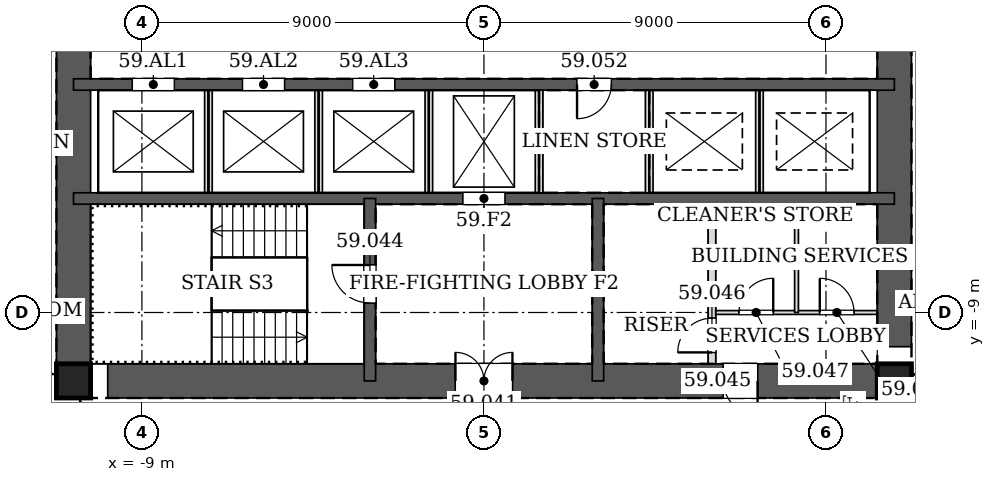
"""IFC4 building model, lengths in metres.
Left out: names, types, materials, properties, quantities, classifications, styles, units other than length and angle.
Written with IfcOpenShell. Run it as: python <this file> out.ifc"""

import sys

from ifc_helpers import new_model, si_unit, direction, frame, frame_2d, origin, origin_2d, place, context, subcontext, project, spatial, rectangle, hollow_rectangle, extrude, element, fill, save


model = new_model("IFC4")
c1 = context("Model", 3, precision=1e-05, world=origin(), true_north=direction((0.0, 1.0)))
c2 = subcontext(c1, "Body", "Model", "MODEL_VIEW")
j1 = project(units=[si_unit("LENGTHUNIT", "METRE"), si_unit("PLANEANGLEUNIT", "RADIAN")], contexts=[c1])
p1 = place(None, origin())
s1 = spatial("IfcSite", under=j1, at=p1, CompositionType="ELEMENT")
p2 = place(p1, origin())
s2 = spatial("IfcBuilding", under=s1, at=p2, CompositionType="ELEMENT")
p3 = place(p2, frame((0.0, 0.0, 248.2)))
s3 = spatial("IfcBuildingStorey", under=s2, at=p3, CompositionType="ELEMENT", Elevation=248.2)
for number, where, z_axis, x_axis in (
    (1, (-10.8, -10.8, 0.0), (0.0, 0.0, 1.0), (1.0, 0.0, 0.0)),
    (2, (10.8, -10.8, 0.0), (0.0, 0.0, 1.0), (1.0, 0.0, 0.0)),
):
    element("IfcColumn", number, at=place(p3, frame(where, z_axis=z_axis, x_axis=x_axis)), inside=s3, PredefinedType="COLUMN", context=c2, shape_type="SweptSolid", body=[
        extrude(hollow_rectangle(XDim=0.9, YDim=0.9, WallThickness=0.04, at=origin_2d()), origin(), (0.0, 0.0, 1.0), 3.4),
    ])
p4 = place(p3, frame((-10.8, -10.8, 0.0), z_axis=(0.0, 0.0, 1.0), x_axis=(1.0, 0.0, 0.0)))
e3 = element("IfcWall", 3, at=p4, inside=s3, PredefinedType="SOLIDWALL", context=c2, shape_type="SweptSolid", body=[
    extrude(rectangle(XDim=21.6, YDim=0.9, at=frame_2d((10.8, 0.0))), origin(), (0.0, 0.0, 1.0), 3.4),
])
p5 = place(p4, frame((10.05, 0.0, 0.0)))
e4 = element("IfcOpeningElement", 4, at=p5, cuts=e3, PredefinedType="OPENING", context=c2, shape_type="SweptSolid", body=[
    extrude(rectangle(XDim=1.5, YDim=2.1, at=frame_2d((0.75, 1.05))), frame((0.0, 0.46, 0.0), z_axis=(0.0, -1.0, 0.0), x_axis=(1.0, 0.0, 0.0)), (0.0, 0.0, 1.0), 0.92),
])
p6 = place(p4, frame((17.1, 0.0, 0.0)))
e5 = element("IfcOpeningElement", 5, at=p6, cuts=e3, PredefinedType="OPENING", context=c2, shape_type="SweptSolid", body=[
    extrude(rectangle(XDim=0.9, YDim=2.1, at=frame_2d((0.45, 1.05))), frame((0.0, 0.46, 0.0), z_axis=(0.0, -1.0, 0.0), x_axis=(1.0, 0.0, 0.0)), (0.0, 0.0, 1.0), 0.92),
])
p7 = place(p3, frame((10.8, -10.8, 0.0), z_axis=(0.0, 0.0, 1.0), x_axis=(0.0, 1.0, 0.0)))
e6 = element("IfcWall", 6, at=p7, inside=s3, PredefinedType="SOLIDWALL", context=c2, shape_type="SweptSolid", body=[
    extrude(rectangle(XDim=21.6, YDim=0.9, at=frame_2d((10.8, 0.0))), origin(), (0.0, 0.0, 1.0), 3.4),
])
p8 = place(p7, frame((11.7, 0.0, 0.0)))
e7 = element("IfcOpeningElement", 7, at=p8, cuts=e6, PredefinedType="OPENING", context=c2, shape_type="SweptSolid", body=[
    extrude(rectangle(XDim=1.2, YDim=2.1, at=frame_2d((0.6, 1.05))), frame((0.0, 0.46, 0.0), z_axis=(0.0, -1.0, 0.0), x_axis=(1.0, 0.0, 0.0)), (0.0, 0.0, 1.0), 0.92),
])
p9 = place(p7, frame((8.7, 0.0, 0.0)))
e8 = element("IfcOpeningElement", 8, at=p9, cuts=e6, PredefinedType="OPENING", context=c2, shape_type="SweptSolid", body=[
    extrude(rectangle(XDim=1.2, YDim=2.1, at=frame_2d((0.6, 1.05))), frame((0.0, 0.46, 0.0), z_axis=(0.0, -1.0, 0.0), x_axis=(1.0, 0.0, 0.0)), (0.0, 0.0, 1.0), 0.92),
])
p10 = place(p3, frame((-10.8, 10.8, 0.0), z_axis=(0.0, 0.0, 1.0), x_axis=(0.0, -1.0, 0.0)))
e9 = element("IfcWall", 9, at=p10, inside=s3, PredefinedType="SOLIDWALL", context=c2, shape_type="SweptSolid", body=[
    extrude(rectangle(XDim=21.6, YDim=0.9, at=frame_2d((10.8, 0.0))), origin(), (0.0, 0.0, 1.0), 3.4),
])
p11 = place(p10, frame((8.7, 0.0, 0.0)))
e10 = element("IfcOpeningElement", 10, at=p11, cuts=e9, PredefinedType="OPENING", context=c2, shape_type="SweptSolid", body=[
    extrude(rectangle(XDim=1.2, YDim=2.1, at=frame_2d((0.6, 1.05))), frame((0.0, 0.46, 0.0), z_axis=(0.0, -1.0, 0.0), x_axis=(1.0, 0.0, 0.0)), (0.0, 0.0, 1.0), 0.92),
])
p12 = place(p10, frame((11.7, 0.0, 0.0)))
e11 = element("IfcOpeningElement", 11, at=p12, cuts=e9, PredefinedType="OPENING", context=c2, shape_type="SweptSolid", body=[
    extrude(rectangle(XDim=1.2, YDim=2.1, at=frame_2d((0.6, 1.05))), frame((0.0, 0.46, 0.0), z_axis=(0.0, -1.0, 0.0), x_axis=(1.0, 0.0, 0.0)), (0.0, 0.0, 1.0), 0.92),
])
p13 = place(p3, frame((-10.8, -3.0, 0.0), z_axis=(0.0, 0.0, 1.0), x_axis=(1.0, 0.0, 0.0)))
e12 = element("IfcWall", 12, at=p13, inside=s3, PredefinedType="SOLIDWALL", context=c2, shape_type="SweptSolid", body=[
    extrude(rectangle(XDim=21.6, YDim=0.3, at=frame_2d((10.8, 0.0))), origin(), (0.0, 0.0, 1.0), 3.4),
])
p14 = place(p13, frame((13.25, 0.0, 0.0)))
e13 = element("IfcOpeningElement", 13, at=p14, cuts=e12, PredefinedType="OPENING", context=c2, shape_type="SweptSolid", body=[
    extrude(rectangle(XDim=0.9, YDim=2.1, at=frame_2d((0.45, 1.05))), frame((0.0, 0.16, 0.0), z_axis=(0.0, -1.0, 0.0), x_axis=(1.0, 0.0, 0.0)), (0.0, 0.0, 1.0), 0.32),
])
p15 = place(p13, frame((1.55, 0.0, 0.0)))
e14 = element("IfcOpeningElement", 14, at=p15, cuts=e12, PredefinedType="OPENING", context=c2, shape_type="SweptSolid", body=[
    extrude(rectangle(XDim=1.1, YDim=2.1, at=frame_2d((0.55, 1.05))), frame((0.0, 0.16, 0.0), z_axis=(0.0, -1.0, 0.0), x_axis=(1.0, 0.0, 0.0)), (0.0, 0.0, 1.0), 0.32),
])
p16 = place(p13, frame((4.45, 0.0, 0.0)))
e15 = element("IfcOpeningElement", 15, at=p16, cuts=e12, PredefinedType="OPENING", context=c2, shape_type="SweptSolid", body=[
    extrude(rectangle(XDim=1.1, YDim=2.1, at=frame_2d((0.55, 1.05))), frame((0.0, 0.16, 0.0), z_axis=(0.0, -1.0, 0.0), x_axis=(1.0, 0.0, 0.0)), (0.0, 0.0, 1.0), 0.32),
])
p17 = place(p13, frame((7.35, 0.0, 0.0)))
e16 = element("IfcOpeningElement", 16, at=p17, cuts=e12, PredefinedType="OPENING", context=c2, shape_type="SweptSolid", body=[
    extrude(rectangle(XDim=1.1, YDim=2.1, at=frame_2d((0.55, 1.05))), frame((0.0, 0.16, 0.0), z_axis=(0.0, -1.0, 0.0), x_axis=(1.0, 0.0, 0.0)), (0.0, 0.0, 1.0), 0.32),
])
p18 = place(p3, frame((-10.8, -6.0, 0.0), z_axis=(0.0, 0.0, 1.0), x_axis=(1.0, 0.0, 0.0)))
e17 = element("IfcWall", 17, at=p18, inside=s3, PredefinedType="SOLIDWALL", context=c2, shape_type="SweptSolid", body=[
    extrude(rectangle(XDim=21.6, YDim=0.3, at=frame_2d((10.8, 0.0))), origin(), (0.0, 0.0, 1.0), 3.4),
])
p19 = place(p18, frame((10.25, 0.0, 0.0)))
e18 = element("IfcOpeningElement", 18, at=p19, cuts=e17, PredefinedType="OPENING", context=c2, shape_type="SweptSolid", body=[
    extrude(rectangle(XDim=1.1, YDim=2.1, at=frame_2d((0.55, 1.05))), frame((0.0, 0.16, 0.0), z_axis=(0.0, -1.0, 0.0), x_axis=(1.0, 0.0, 0.0)), (0.0, 0.0, 1.0), 0.32),
])
p20 = place(p3, frame((-3.0, -6.0, 0.0), z_axis=(0.0, 0.0, 1.0), x_axis=(0.0, -1.0, 0.0)))
e19 = element("IfcWall", 19, at=p20, inside=s3, PredefinedType="SOLIDWALL", context=c2, shape_type="SweptSolid", body=[
    extrude(rectangle(XDim=4.8, YDim=0.3, at=frame_2d((2.4, 0.0))), origin(), (0.0, 0.0, 1.0), 3.4),
])
p21 = place(p20, frame((1.75, 0.0, 0.0)))
e20 = element("IfcOpeningElement", 20, at=p21, cuts=e19, PredefinedType="OPENING", context=c2, shape_type="SweptSolid", body=[
    extrude(rectangle(XDim=1.0, YDim=2.1, at=frame_2d((0.5, 1.05))), frame((0.0, 0.16, 0.0), z_axis=(0.0, -1.0, 0.0), x_axis=(1.0, 0.0, 0.0)), (0.0, 0.0, 1.0), 0.32),
])
p22 = place(p3, frame((3.0, -6.0, 0.0), z_axis=(0.0, 0.0, 1.0), x_axis=(0.0, -1.0, 0.0)))
e21 = element("IfcWall", 21, at=p22, inside=s3, PredefinedType="SOLIDWALL", context=c2, shape_type="SweptSolid", body=[
    extrude(rectangle(XDim=4.8, YDim=0.3, at=frame_2d((2.4, 0.0))), origin(), (0.0, 0.0, 1.0), 3.4),
])
for number, where, z_axis, x_axis in (
    (22, (-7.25, -5.85, 0.0), (0.0, 0.0, 1.0), (0.0, 1.0, 0.0)),
    (23, (-4.35, -5.85, 0.0), (0.0, 0.0, 1.0), (0.0, 1.0, 0.0)),
    (24, (-1.45, -5.85, 0.0), (0.0, 0.0, 1.0), (0.0, 1.0, 0.0)),
):
    element("IfcWall", number, at=place(p3, frame(where, z_axis=z_axis, x_axis=x_axis)), inside=s3, PredefinedType="PARTITIONING", context=c2, shape_type="SweptSolid", body=[
        extrude(rectangle(XDim=2.7, YDim=0.2, at=frame_2d((1.35, 0.0))), origin(), (0.0, 0.0, 1.0), 3.4),
    ])
for number, where, z_axis, x_axis in (
    (25, (1.45, -5.85, 0.0), (0.0, 0.0, 1.0), (0.0, 1.0, 0.0)),
    (26, (4.35, -5.85, 0.0), (0.0, 0.0, 1.0), (0.0, 1.0, 0.0)),
):
    element("IfcWall", number, at=place(p3, frame(where, z_axis=z_axis, x_axis=x_axis)), inside=s3, PredefinedType="PARTITIONING", context=c2, shape_type="SweptSolid", body=[
        extrude(rectangle(XDim=2.7, YDim=0.2, at=frame_2d((1.35, 0.0))), origin(), (0.0, 0.0, 1.0), 3.2),
    ])
p23 = place(p3, frame((7.25, -5.85, 0.0), z_axis=(0.0, 0.0, 1.0), x_axis=(0.0, 1.0, 0.0)))
e27 = element("IfcWall", 27, at=p23, inside=s3, PredefinedType="PARTITIONING", context=c2, shape_type="SweptSolid", body=[
    extrude(rectangle(XDim=2.7, YDim=0.2, at=frame_2d((1.35, 0.0))), origin(), (0.0, 0.0, 1.0), 3.4),
])
p24 = place(p3, frame((6.0, -10.35, 0.0), z_axis=(0.0, 0.0, 1.0), x_axis=(0.0, 1.0, 0.0)))
e28 = element("IfcWall", 28, at=p24, inside=s3, PredefinedType="PARTITIONING", context=c2, shape_type="SweptSolid", body=[
    extrude(rectangle(XDim=4.2, YDim=0.2, at=frame_2d((2.1, 0.0))), origin(), (0.0, 0.0, 1.0), 3.2),
])
p25 = place(p24, frame((0.3, 0.0, 0.0)))
e29 = element("IfcOpeningElement", 29, at=p25, cuts=e28, PredefinedType="OPENING", context=c2, shape_type="SweptSolid", body=[
    extrude(rectangle(XDim=0.9, YDim=2.1, at=frame_2d((0.45, 1.05))), frame((0.0, 0.11, 0.0), z_axis=(0.0, -1.0, 0.0), x_axis=(1.0, 0.0, 0.0)), (0.0, 0.0, 1.0), 0.22),
])
p26 = place(p3, frame((6.1, -9.0, 0.0), z_axis=(0.0, 0.0, 1.0), x_axis=(1.0, 0.0, 0.0)))
e30 = element("IfcWall", 30, at=p26, inside=s3, PredefinedType="PARTITIONING", context=c2, shape_type="SweptSolid", body=[
    extrude(rectangle(XDim=4.25, YDim=0.1, at=frame_2d((2.125, 0.0))), origin(), (0.0, 0.0, 1.0), 3.2),
])
p27 = place(p26, frame((0.613, 0.0, 0.0)))
e31 = element("IfcOpeningElement", 31, at=p27, cuts=e30, PredefinedType="OPENING", context=c2, shape_type="SweptSolid", body=[
    extrude(rectangle(XDim=0.9, YDim=2.1, at=frame_2d((0.45, 1.05))), frame((0.0, 0.06, 0.0), z_axis=(0.0, -1.0, 0.0), x_axis=(1.0, 0.0, 0.0)), (0.0, 0.0, 1.0), 0.12),
])
p28 = place(p26, frame((2.738, 0.0, 0.0)))
e32 = element("IfcOpeningElement", 32, at=p28, cuts=e30, PredefinedType="OPENING", context=c2, shape_type="SweptSolid", body=[
    extrude(rectangle(XDim=0.9, YDim=2.1, at=frame_2d((0.45, 1.05))), frame((0.0, 0.06, 0.0), z_axis=(0.0, -1.0, 0.0), x_axis=(1.0, 0.0, 0.0)), (0.0, 0.0, 1.0), 0.12),
])
p29 = place(p3, frame((8.225, -9.0, 0.0), z_axis=(0.0, 0.0, 1.0), x_axis=(0.0, 1.0, 0.0)))
e33 = element("IfcWall", 33, at=p29, inside=s3, PredefinedType="PARTITIONING", context=c2, shape_type="SweptSolid", body=[
    extrude(rectangle(XDim=2.85, YDim=0.1, at=frame_2d((1.425, 0.0))), origin(), (0.0, 0.0, 1.0), 3.2),
])
p30 = place(p5, origin())
e34 = element("IfcDoor", 34, at=p30, inside=s3, OperationType="DOUBLE_DOOR_SINGLE_SWING", PredefinedType="DOOR", context=c2, shape_type="SweptSolid", body=[
    extrude(rectangle(XDim=1.5, YDim=2.1, at=frame_2d((0.75, 1.05))), frame((0.0, 0.025, 0.0), z_axis=(0.0, -1.0, 0.0), x_axis=(1.0, 0.0, 0.0)), (0.0, 0.0, 1.0), 0.05),
])
fill(e4, e34)
p31 = place(p21, frame((1.0, 0.0, 0.0), z_axis=(0.0, 0.0, 1.0), x_axis=(-1.0, 0.0, 0.0)))
e35 = element("IfcDoor", 35, at=p31, inside=s3, OperationType="SINGLE_SWING_RIGHT", PredefinedType="DOOR", context=c2, shape_type="SweptSolid", body=[
    extrude(rectangle(XDim=1.0, YDim=2.1, at=frame_2d((0.5, 1.05))), frame((0.0, 0.025, 0.0), z_axis=(0.0, -1.0, 0.0), x_axis=(1.0, 0.0, 0.0)), (0.0, 0.0, 1.0), 0.05),
])
fill(e20, e35)
p32 = place(p6, frame((0.9, 0.0, 0.0), z_axis=(0.0, 0.0, 1.0), x_axis=(-1.0, 0.0, 0.0)))
e36 = element("IfcDoor", 36, at=p32, inside=s3, OperationType="SINGLE_SWING_LEFT", PredefinedType="DOOR", context=c2, shape_type="SweptSolid", body=[
    extrude(rectangle(XDim=0.9, YDim=2.1, at=frame_2d((0.45, 1.05))), frame((0.0, 0.025, 0.0), z_axis=(0.0, -1.0, 0.0), x_axis=(1.0, 0.0, 0.0)), (0.0, 0.0, 1.0), 0.05),
])
fill(e5, e36)
p33 = place(p25, origin())
e37 = element("IfcDoor", 37, at=p33, inside=s3, OperationType="SINGLE_SWING_LEFT", PredefinedType="DOOR", context=c2, shape_type="SweptSolid", body=[
    extrude(rectangle(XDim=0.9, YDim=2.1, at=frame_2d((0.45, 1.05))), frame((0.0, 0.025, 0.0), z_axis=(0.0, -1.0, 0.0), x_axis=(1.0, 0.0, 0.0)), (0.0, 0.0, 1.0), 0.05),
])
fill(e29, e37)
p34 = place(p27, origin())
e38 = element("IfcDoor", 38, at=p34, inside=s3, OperationType="SINGLE_SWING_RIGHT", PredefinedType="DOOR", context=c2, shape_type="SweptSolid", body=[
    extrude(rectangle(XDim=0.9, YDim=2.1, at=frame_2d((0.45, 1.05))), frame((0.0, 0.025, 0.0), z_axis=(0.0, -1.0, 0.0), x_axis=(1.0, 0.0, 0.0)), (0.0, 0.0, 1.0), 0.05),
])
fill(e31, e38)
p35 = place(p28, origin())
e39 = element("IfcDoor", 39, at=p35, inside=s3, OperationType="SINGLE_SWING_LEFT", PredefinedType="DOOR", context=c2, shape_type="SweptSolid", body=[
    extrude(rectangle(XDim=0.9, YDim=2.1, at=frame_2d((0.45, 1.05))), frame((0.0, 0.025, 0.0), z_axis=(0.0, -1.0, 0.0), x_axis=(1.0, 0.0, 0.0)), (0.0, 0.0, 1.0), 0.05),
])
fill(e32, e39)
p36 = place(p14, frame((0.9, 0.0, 0.0), z_axis=(0.0, 0.0, 1.0), x_axis=(-1.0, 0.0, 0.0)))
e40 = element("IfcDoor", 40, at=p36, inside=s3, OperationType="SINGLE_SWING_RIGHT", PredefinedType="DOOR", context=c2, shape_type="SweptSolid", body=[
    extrude(rectangle(XDim=0.9, YDim=2.1, at=frame_2d((0.45, 1.05))), frame((0.0, 0.025, 0.0), z_axis=(0.0, -1.0, 0.0), x_axis=(1.0, 0.0, 0.0)), (0.0, 0.0, 1.0), 0.05),
])
fill(e13, e40)
p37 = place(p19, origin())
e41 = element("IfcDoor", 41, at=p37, inside=s3, OperationType="DOUBLE_DOOR_SLIDING", PredefinedType="DOOR", context=c2, shape_type="SweptSolid", body=[
    extrude(rectangle(XDim=1.1, YDim=2.1, at=frame_2d((0.55, 1.05))), frame((0.0, 0.025, 0.0), z_axis=(0.0, -1.0, 0.0), x_axis=(1.0, 0.0, 0.0)), (0.0, 0.0, 1.0), 0.05),
])
fill(e18, e41)
p38 = place(p15, origin())
e42 = element("IfcDoor", 42, at=p38, inside=s3, OperationType="DOUBLE_DOOR_SLIDING", PredefinedType="DOOR", context=c2, shape_type="SweptSolid", body=[
    extrude(rectangle(XDim=1.1, YDim=2.1, at=frame_2d((0.55, 1.05))), frame((0.0, 0.025, 0.0), z_axis=(0.0, -1.0, 0.0), x_axis=(1.0, 0.0, 0.0)), (0.0, 0.0, 1.0), 0.05),
])
fill(e14, e42)
p39 = place(p16, origin())
e43 = element("IfcDoor", 43, at=p39, inside=s3, OperationType="DOUBLE_DOOR_SLIDING", PredefinedType="DOOR", context=c2, shape_type="SweptSolid", body=[
    extrude(rectangle(XDim=1.1, YDim=2.1, at=frame_2d((0.55, 1.05))), frame((0.0, 0.025, 0.0), z_axis=(0.0, -1.0, 0.0), x_axis=(1.0, 0.0, 0.0)), (0.0, 0.0, 1.0), 0.05),
])
fill(e15, e43)
p40 = place(p17, origin())
e44 = element("IfcDoor", 44, at=p40, inside=s3, OperationType="DOUBLE_DOOR_SLIDING", PredefinedType="DOOR", context=c2, shape_type="SweptSolid", body=[
    extrude(rectangle(XDim=1.1, YDim=2.1, at=frame_2d((0.55, 1.05))), frame((0.0, 0.025, 0.0), z_axis=(0.0, -1.0, 0.0), x_axis=(1.0, 0.0, 0.0)), (0.0, 0.0, 1.0), 0.05),
])
fill(e16, e44)
save(model, sys.argv[1])
